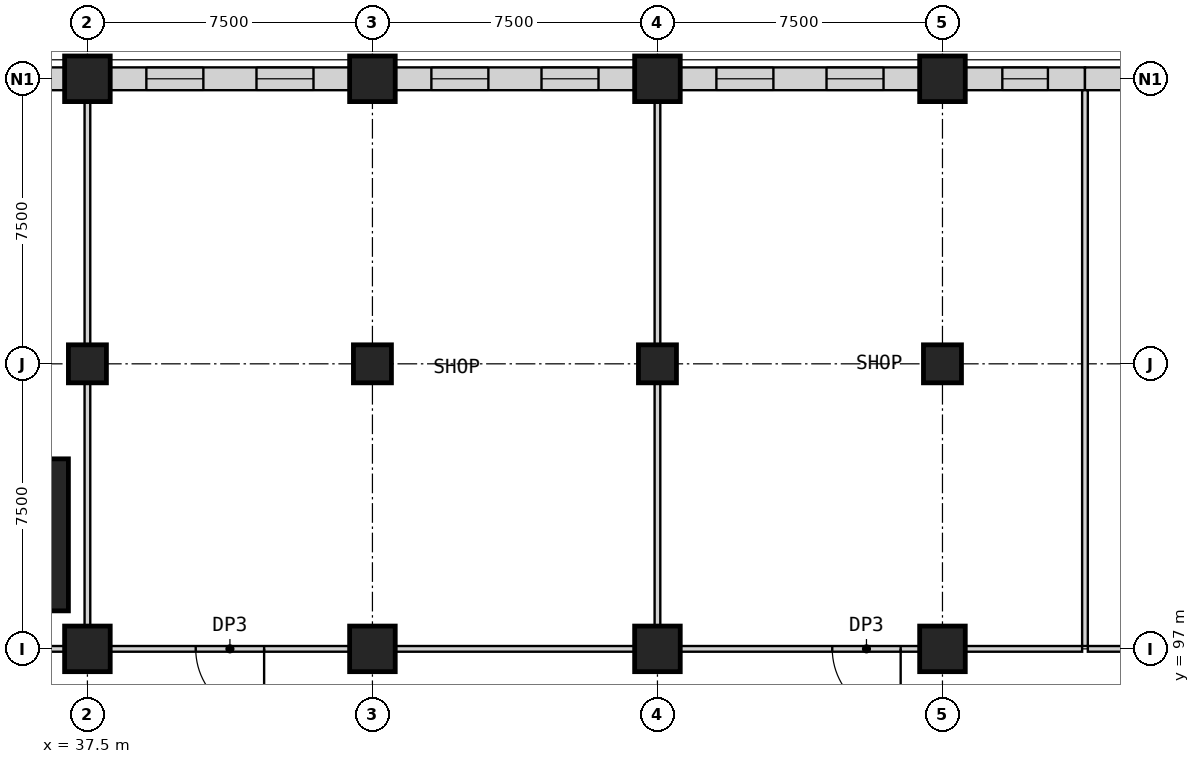
"""IFC4 building model, lengths in metres.
Left out: names, types, materials, properties, quantities, classifications, styles, units other than length and angle.
Written with IfcOpenShell. Run it as: python <this file> out.ifc"""

import sys

from ifc_helpers import new_model, si_unit, direction, frame, frame_2d, origin, origin_2d, place, context, subcontext, project, spatial, rectangle, extrude, element, fill, save


model = new_model("IFC4")
c1 = context("Model", 3, precision=1e-05, world=origin(), true_north=direction((0.0, 1.0)))
c2 = subcontext(c1, "Body", "Model", "MODEL_VIEW")
j1 = project(units=[si_unit("LENGTHUNIT", "METRE"), si_unit("PLANEANGLEUNIT", "RADIAN")], contexts=[c1])
p1 = place(None, origin())
s1 = spatial("IfcSite", under=j1, at=p1, CompositionType="ELEMENT")
p2 = place(p1, origin())
s2 = spatial("IfcBuilding", under=s1, at=p2, CompositionType="ELEMENT")
p3 = place(p2, frame((0.0, 0.0, 13.5)))
s3 = spatial("IfcBuildingStorey", under=s2, at=p3, CompositionType="ELEMENT", Elevation=13.5)
p4 = place(p3, frame((37.5, 97.0, 0.0), z_axis=(0.0, 0.0, 1.0), x_axis=(1.0, 0.0, 0.0)))
e1 = element("IfcColumn", 1, at=p4, inside=s3, PredefinedType="COLUMN", context=c2, shape_type="SweptSolid", body=[
    extrude(rectangle(XDim=1.2, YDim=1.2, at=origin_2d()), origin(), (0.0, 0.0, 1.0), 5.0),
])
p5 = place(p3, frame((37.5, 104.5, 0.0), z_axis=(0.0, 0.0, 1.0), x_axis=(1.0, 0.0, 0.0)))
e2 = element("IfcColumn", 2, at=p5, inside=s3, PredefinedType="COLUMN", context=c2, shape_type="SweptSolid", body=[
    extrude(rectangle(XDim=1.0, YDim=1.0, at=origin_2d()), origin(), (0.0, 0.0, 1.0), 5.0),
])
p6 = place(p3, frame((45.0, 97.0, 0.0), z_axis=(0.0, 0.0, 1.0), x_axis=(1.0, 0.0, 0.0)))
e3 = element("IfcColumn", 3, at=p6, inside=s3, PredefinedType="COLUMN", context=c2, shape_type="SweptSolid", body=[
    extrude(rectangle(XDim=1.2, YDim=1.2, at=origin_2d()), origin(), (0.0, 0.0, 1.0), 5.0),
])
p7 = place(p3, frame((45.0, 104.5, 0.0), z_axis=(0.0, 0.0, 1.0), x_axis=(1.0, 0.0, 0.0)))
e4 = element("IfcColumn", 4, at=p7, inside=s3, PredefinedType="COLUMN", context=c2, shape_type="SweptSolid", body=[
    extrude(rectangle(XDim=1.0, YDim=1.0, at=origin_2d()), origin(), (0.0, 0.0, 1.0), 5.0),
])
p8 = place(p3, frame((52.5, 97.0, 0.0), z_axis=(0.0, 0.0, 1.0), x_axis=(1.0, 0.0, 0.0)))
e5 = element("IfcColumn", 5, at=p8, inside=s3, PredefinedType="COLUMN", context=c2, shape_type="SweptSolid", body=[
    extrude(rectangle(XDim=1.2, YDim=1.2, at=origin_2d()), origin(), (0.0, 0.0, 1.0), 5.0),
])
p9 = place(p3, frame((52.5, 104.5, 0.0), z_axis=(0.0, 0.0, 1.0), x_axis=(1.0, 0.0, 0.0)))
e6 = element("IfcColumn", 6, at=p9, inside=s3, PredefinedType="COLUMN", context=c2, shape_type="SweptSolid", body=[
    extrude(rectangle(XDim=1.0, YDim=1.0, at=origin_2d()), origin(), (0.0, 0.0, 1.0), 5.0),
])
p10 = place(p3, frame((60.0, 97.0, 0.0), z_axis=(0.0, 0.0, 1.0), x_axis=(1.0, 0.0, 0.0)))
e7 = element("IfcColumn", 7, at=p10, inside=s3, PredefinedType="COLUMN", context=c2, shape_type="SweptSolid", body=[
    extrude(rectangle(XDim=1.2, YDim=1.2, at=origin_2d()), origin(), (0.0, 0.0, 1.0), 5.0),
])
p11 = place(p3, frame((60.0, 104.5, 0.0), z_axis=(0.0, 0.0, 1.0), x_axis=(1.0, 0.0, 0.0)))
e8 = element("IfcColumn", 8, at=p11, inside=s3, PredefinedType="COLUMN", context=c2, shape_type="SweptSolid", body=[
    extrude(rectangle(XDim=1.0, YDim=1.0, at=origin_2d()), origin(), (0.0, 0.0, 1.0), 5.0),
])
p12 = place(p3, frame((35.0, 100.0, 0.0), z_axis=(0.0, 0.0, 1.0), x_axis=(1.0, 0.0, 0.0)))
e9 = element("IfcColumn", 9, at=p12, inside=s3, PredefinedType="COLUMN", context=c2, shape_type="SweptSolid", body=[
    extrude(rectangle(XDim=4.0, YDim=4.0, at=origin_2d()), origin(), (0.0, 0.0, 1.0), 5.0),
])
for number, where, z_axis, x_axis in (
    (10, (37.5, 112.0, 0.0), (0.0, 0.0, 1.0), (1.0, 0.0, 0.0)),
    (11, (45.0, 112.0, 0.0), (0.0, 0.0, 1.0), (1.0, 0.0, 0.0)),
    (12, (52.5, 112.0, 0.0), (0.0, 0.0, 1.0), (1.0, 0.0, 0.0)),
    (13, (60.0, 112.0, 0.0), (0.0, 0.0, 1.0), (1.0, 0.0, 0.0)),
):
    element("IfcColumn", number, at=place(p3, frame(where, z_axis=z_axis, x_axis=x_axis)), inside=s3, PredefinedType="COLUMN", context=c2, shape_type="SweptSolid", body=[
        extrude(rectangle(XDim=1.2, YDim=1.2, at=origin_2d()), origin(), (0.0, 0.0, 1.0), 5.0),
    ])
p13 = place(p3, frame((31.0, 97.0, 0.0), z_axis=(0.0, 0.0, 1.0), x_axis=(1.0, 0.0, 0.0)))
e14 = element("IfcWall", 14, at=p13, inside=s3, PredefinedType="PARTITIONING", context=c2, shape_type="SweptSolid", body=[
    extrude(rectangle(XDim=5.9, YDim=0.15, at=frame_2d((2.95, 0.0))), origin(), (0.0, 0.0, 1.0), 4.7),
])
p14 = place(p3, frame((44.4, 97.0, 0.0), z_axis=(0.0, 0.0, 1.0), x_axis=(-1.0, 0.0, 0.0)))
e15 = element("IfcWall", 15, at=p14, inside=s3, PredefinedType="PARTITIONING", context=c2, shape_type="SweptSolid", body=[
    extrude(rectangle(XDim=6.3, YDim=0.15, at=frame_2d((3.15, 0.0))), origin(), (0.0, 0.0, 1.0), 4.7),
])
p15 = place(p14, frame((2.25, 0.0, 0.0)))
e16 = element("IfcOpeningElement", 16, at=p15, cuts=e15, PredefinedType="OPENING", context=c2, shape_type="SweptSolid", body=[
    extrude(rectangle(XDim=1.8, YDim=2.4, at=frame_2d((0.9, 1.2))), frame((0.0, 0.085, 0.0), z_axis=(0.0, -1.0, 0.0), x_axis=(1.0, 0.0, 0.0)), (0.0, 0.0, 1.0), 0.17),
])
p16 = place(p3, frame((45.6, 97.0, 0.0), z_axis=(0.0, 0.0, 1.0), x_axis=(1.0, 0.0, 0.0)))
e17 = element("IfcWall", 17, at=p16, inside=s3, PredefinedType="PARTITIONING", context=c2, shape_type="SweptSolid", body=[
    extrude(rectangle(XDim=6.3, YDim=0.15, at=frame_2d((3.15, 0.0))), origin(), (0.0, 0.0, 1.0), 4.7),
])
p17 = place(p3, frame((59.4, 97.0, 0.0), z_axis=(0.0, 0.0, 1.0), x_axis=(-1.0, 0.0, 0.0)))
e18 = element("IfcWall", 18, at=p17, inside=s3, PredefinedType="PARTITIONING", context=c2, shape_type="SweptSolid", body=[
    extrude(rectangle(XDim=6.3, YDim=0.15, at=frame_2d((3.15, 0.0))), origin(), (0.0, 0.0, 1.0), 4.7),
])
p18 = place(p17, frame((0.5, 0.0, 0.0)))
e19 = element("IfcOpeningElement", 19, at=p18, cuts=e18, PredefinedType="OPENING", context=c2, shape_type="SweptSolid", body=[
    extrude(rectangle(XDim=1.8, YDim=2.4, at=frame_2d((0.9, 1.2))), frame((0.0, 0.085, 0.0), z_axis=(0.0, -1.0, 0.0), x_axis=(1.0, 0.0, 0.0)), (0.0, 0.0, 1.0), 0.17),
])
for number, where, z_axis, x_axis in (
    (20, (60.6, 97.0, 0.0), (0.0, 0.0, 1.0), (1.0, 0.0, 0.0)),
    (21, (63.825, 97.0, 0.0), (0.0, 0.0, 1.0), (1.0, 0.0, 0.0)),
):
    element("IfcWall", number, at=place(p3, frame(where, z_axis=z_axis, x_axis=x_axis)), inside=s3, PredefinedType="PARTITIONING", context=c2, shape_type="SweptSolid", body=[
        extrude(rectangle(XDim=3.075, YDim=0.15, at=frame_2d((1.538, 0.0))), origin(), (0.0, 0.0, 1.0), 4.7),
    ])
p19 = place(p3, frame((31.1, 112.0, 0.0), z_axis=(0.0, 0.0, 1.0), x_axis=(1.0, 0.0, 0.0)))
e22 = element("IfcWall", 22, at=p19, inside=s3, PredefinedType="PARTITIONING", context=c2, shape_type="SweptSolid", body=[
    extrude(rectangle(XDim=5.8, YDim=0.6, at=frame_2d((2.9, 0.0))), origin(), (0.0, 0.0, 1.0), 4.1),
])
p20 = place(p19, frame((0.816, 0.0, 0.9)))
e23 = element("IfcOpeningElement", 23, at=p20, cuts=e22, PredefinedType="OPENING", context=c2, shape_type="SweptSolid", body=[
    extrude(rectangle(XDim=1.5, YDim=2.8, at=frame_2d((0.75, 1.4))), frame((0.0, 0.31, 0.0), z_axis=(0.0, -1.0, 0.0), x_axis=(1.0, 0.0, 0.0)), (0.0, 0.0, 1.0), 0.62),
])
p21 = place(p19, frame((3.484, 0.0, 0.9)))
e24 = element("IfcOpeningElement", 24, at=p21, cuts=e22, PredefinedType="OPENING", context=c2, shape_type="SweptSolid", body=[
    extrude(rectangle(XDim=1.5, YDim=2.8, at=frame_2d((0.75, 1.4))), frame((0.0, 0.31, 0.0), z_axis=(0.0, -1.0, 0.0), x_axis=(1.0, 0.0, 0.0)), (0.0, 0.0, 1.0), 0.62),
])
p22 = place(p3, frame((38.1, 112.0, 0.0), z_axis=(0.0, 0.0, 1.0), x_axis=(1.0, 0.0, 0.0)))
e25 = element("IfcWall", 25, at=p22, inside=s3, PredefinedType="PARTITIONING", context=c2, shape_type="SweptSolid", body=[
    extrude(rectangle(XDim=6.3, YDim=0.6, at=frame_2d((3.15, 0.0))), origin(), (0.0, 0.0, 1.0), 4.1),
])
p23 = place(p22, frame((0.951, 0.0, 0.9)))
e26 = element("IfcOpeningElement", 26, at=p23, cuts=e25, PredefinedType="OPENING", context=c2, shape_type="SweptSolid", body=[
    extrude(rectangle(XDim=1.5, YDim=2.8, at=frame_2d((0.75, 1.4))), frame((0.0, 0.31, 0.0), z_axis=(0.0, -1.0, 0.0), x_axis=(1.0, 0.0, 0.0)), (0.0, 0.0, 1.0), 0.62),
])
p24 = place(p22, frame((3.849, 0.0, 0.9)))
e27 = element("IfcOpeningElement", 27, at=p24, cuts=e25, PredefinedType="OPENING", context=c2, shape_type="SweptSolid", body=[
    extrude(rectangle(XDim=1.5, YDim=2.8, at=frame_2d((0.75, 1.4))), frame((0.0, 0.31, 0.0), z_axis=(0.0, -1.0, 0.0), x_axis=(1.0, 0.0, 0.0)), (0.0, 0.0, 1.0), 0.62),
])
p25 = place(p3, frame((45.6, 112.0, 0.0), z_axis=(0.0, 0.0, 1.0), x_axis=(1.0, 0.0, 0.0)))
e28 = element("IfcWall", 28, at=p25, inside=s3, PredefinedType="PARTITIONING", context=c2, shape_type="SweptSolid", body=[
    extrude(rectangle(XDim=6.3, YDim=0.6, at=frame_2d((3.15, 0.0))), origin(), (0.0, 0.0, 1.0), 4.1),
])
p26 = place(p25, frame((0.951, 0.0, 0.9)))
e29 = element("IfcOpeningElement", 29, at=p26, cuts=e28, PredefinedType="OPENING", context=c2, shape_type="SweptSolid", body=[
    extrude(rectangle(XDim=1.5, YDim=2.8, at=frame_2d((0.75, 1.4))), frame((0.0, 0.31, 0.0), z_axis=(0.0, -1.0, 0.0), x_axis=(1.0, 0.0, 0.0)), (0.0, 0.0, 1.0), 0.62),
])
p27 = place(p25, frame((3.849, 0.0, 0.9)))
e30 = element("IfcOpeningElement", 30, at=p27, cuts=e28, PredefinedType="OPENING", context=c2, shape_type="SweptSolid", body=[
    extrude(rectangle(XDim=1.5, YDim=2.8, at=frame_2d((0.75, 1.4))), frame((0.0, 0.31, 0.0), z_axis=(0.0, -1.0, 0.0), x_axis=(1.0, 0.0, 0.0)), (0.0, 0.0, 1.0), 0.62),
])
p28 = place(p3, frame((53.1, 112.0, 0.0), z_axis=(0.0, 0.0, 1.0), x_axis=(1.0, 0.0, 0.0)))
e31 = element("IfcWall", 31, at=p28, inside=s3, PredefinedType="PARTITIONING", context=c2, shape_type="SweptSolid", body=[
    extrude(rectangle(XDim=6.3, YDim=0.6, at=frame_2d((3.15, 0.0))), origin(), (0.0, 0.0, 1.0), 4.1),
])
p29 = place(p28, frame((0.951, 0.0, 0.9)))
e32 = element("IfcOpeningElement", 32, at=p29, cuts=e31, PredefinedType="OPENING", context=c2, shape_type="SweptSolid", body=[
    extrude(rectangle(XDim=1.5, YDim=2.8, at=frame_2d((0.75, 1.4))), frame((0.0, 0.31, 0.0), z_axis=(0.0, -1.0, 0.0), x_axis=(1.0, 0.0, 0.0)), (0.0, 0.0, 1.0), 0.62),
])
p30 = place(p28, frame((3.849, 0.0, 0.9)))
e33 = element("IfcOpeningElement", 33, at=p30, cuts=e31, PredefinedType="OPENING", context=c2, shape_type="SweptSolid", body=[
    extrude(rectangle(XDim=1.5, YDim=2.8, at=frame_2d((0.75, 1.4))), frame((0.0, 0.31, 0.0), z_axis=(0.0, -1.0, 0.0), x_axis=(1.0, 0.0, 0.0)), (0.0, 0.0, 1.0), 0.62),
])
p31 = place(p3, frame((60.6, 112.0, 0.0), z_axis=(0.0, 0.0, 1.0), x_axis=(1.0, 0.0, 0.0)))
e34 = element("IfcWall", 34, at=p31, inside=s3, PredefinedType="PARTITIONING", context=c2, shape_type="SweptSolid", body=[
    extrude(rectangle(XDim=3.15, YDim=0.6, at=frame_2d((1.575, 0.0))), origin(), (0.0, 0.0, 1.0), 4.1),
])
p32 = place(p31, frame((0.975, 0.0, 0.9)))
e35 = element("IfcOpeningElement", 35, at=p32, cuts=e34, PredefinedType="OPENING", context=c2, shape_type="SweptSolid", body=[
    extrude(rectangle(XDim=1.2, YDim=2.8, at=frame_2d((0.6, 1.4))), frame((0.0, 0.31, 0.0), z_axis=(0.0, -1.0, 0.0), x_axis=(1.0, 0.0, 0.0)), (0.0, 0.0, 1.0), 0.62),
])
p33 = place(p3, frame((63.75, 112.0, 0.0), z_axis=(0.0, 0.0, 1.0), x_axis=(1.0, 0.0, 0.0)))
e36 = element("IfcWall", 36, at=p33, inside=s3, PredefinedType="PARTITIONING", context=c2, shape_type="SweptSolid", body=[
    extrude(rectangle(XDim=3.15, YDim=0.6, at=frame_2d((1.575, 0.0))), origin(), (0.0, 0.0, 1.0), 4.1),
])
p34 = place(p33, frame((0.975, 0.0, 0.9)))
e37 = element("IfcOpeningElement", 37, at=p34, cuts=e36, PredefinedType="OPENING", context=c2, shape_type="SweptSolid", body=[
    extrude(rectangle(XDim=1.2, YDim=2.8, at=frame_2d((0.6, 1.4))), frame((0.0, 0.31, 0.0), z_axis=(0.0, -1.0, 0.0), x_axis=(1.0, 0.0, 0.0)), (0.0, 0.0, 1.0), 0.62),
])
p35 = place(p3, frame((63.75, 97.075, 0.0), z_axis=(0.0, 0.0, 1.0), x_axis=(0.0, 1.0, 0.0)))
e38 = element("IfcWall", 38, at=p35, inside=s3, PredefinedType="PARTITIONING", context=c2, shape_type="SweptSolid", body=[
    extrude(rectangle(XDim=14.625, YDim=0.15, at=frame_2d((7.312, 0.0))), origin(), (0.0, 0.0, 1.0), 4.7),
])
for number, where, z_axis, x_axis in (
    (39, (37.5, 97.6, 0.0), (0.0, 0.0, 1.0), (0.0, 1.0, 0.0)),
    (40, (37.5, 105.0, 0.0), (0.0, 0.0, 1.0), (0.0, 1.0, 0.0)),
    (41, (52.5, 97.6, 0.0), (0.0, 0.0, 1.0), (0.0, 1.0, 0.0)),
    (42, (52.5, 105.0, 0.0), (0.0, 0.0, 1.0), (0.0, 1.0, 0.0)),
):
    element("IfcWall", number, at=place(p3, frame(where, z_axis=z_axis, x_axis=x_axis)), inside=s3, PredefinedType="PARTITIONING", context=c2, shape_type="SweptSolid", body=[
        extrude(rectangle(XDim=6.4, YDim=0.15, at=frame_2d((3.2, 0.0))), origin(), (0.0, 0.0, 1.0), 4.7),
    ])
p36 = place(p15, origin())
e43 = element("IfcDoor", 43, at=p36, inside=s3, OperationType="SINGLE_SWING_LEFT", PredefinedType="DOOR", context=c2, shape_type="SweptSolid", body=[
    extrude(rectangle(XDim=1.8, YDim=2.4, at=frame_2d((0.9, 1.2))), frame((0.0, 0.025, 0.0), z_axis=(0.0, -1.0, 0.0), x_axis=(1.0, 0.0, 0.0)), (0.0, 0.0, 1.0), 0.05),
])
fill(e16, e43)
p37 = place(p18, origin())
e44 = element("IfcDoor", 44, at=p37, inside=s3, OperationType="SINGLE_SWING_LEFT", PredefinedType="DOOR", context=c2, shape_type="SweptSolid", body=[
    extrude(rectangle(XDim=1.8, YDim=2.4, at=frame_2d((0.9, 1.2))), frame((0.0, 0.025, 0.0), z_axis=(0.0, -1.0, 0.0), x_axis=(1.0, 0.0, 0.0)), (0.0, 0.0, 1.0), 0.05),
])
fill(e19, e44)
p38 = place(p23, origin())
e45 = element("IfcWindow", 45, at=p38, inside=s3, PartitioningType="SINGLE_PANEL", PredefinedType="WINDOW", context=c2, shape_type="SweptSolid", body=[
    extrude(rectangle(XDim=1.5, YDim=2.8, at=frame_2d((0.75, 1.4))), frame((0.0, 0.03, 0.0), z_axis=(0.0, -1.0, 0.0), x_axis=(1.0, 0.0, 0.0)), (0.0, 0.0, 1.0), 0.06),
])
fill(e26, e45)
p39 = place(p24, origin())
e46 = element("IfcWindow", 46, at=p39, inside=s3, PartitioningType="SINGLE_PANEL", PredefinedType="WINDOW", context=c2, shape_type="SweptSolid", body=[
    extrude(rectangle(XDim=1.5, YDim=2.8, at=frame_2d((0.75, 1.4))), frame((0.0, 0.03, 0.0), z_axis=(0.0, -1.0, 0.0), x_axis=(1.0, 0.0, 0.0)), (0.0, 0.0, 1.0), 0.06),
])
fill(e27, e46)
p40 = place(p26, origin())
e47 = element("IfcWindow", 47, at=p40, inside=s3, PartitioningType="SINGLE_PANEL", PredefinedType="WINDOW", context=c2, shape_type="SweptSolid", body=[
    extrude(rectangle(XDim=1.5, YDim=2.8, at=frame_2d((0.75, 1.4))), frame((0.0, 0.03, 0.0), z_axis=(0.0, -1.0, 0.0), x_axis=(1.0, 0.0, 0.0)), (0.0, 0.0, 1.0), 0.06),
])
fill(e29, e47)
p41 = place(p27, origin())
e48 = element("IfcWindow", 48, at=p41, inside=s3, PartitioningType="SINGLE_PANEL", PredefinedType="WINDOW", context=c2, shape_type="SweptSolid", body=[
    extrude(rectangle(XDim=1.5, YDim=2.8, at=frame_2d((0.75, 1.4))), frame((0.0, 0.03, 0.0), z_axis=(0.0, -1.0, 0.0), x_axis=(1.0, 0.0, 0.0)), (0.0, 0.0, 1.0), 0.06),
])
fill(e30, e48)
p42 = place(p29, origin())
e49 = element("IfcWindow", 49, at=p42, inside=s3, PartitioningType="SINGLE_PANEL", PredefinedType="WINDOW", context=c2, shape_type="SweptSolid", body=[
    extrude(rectangle(XDim=1.5, YDim=2.8, at=frame_2d((0.75, 1.4))), frame((0.0, 0.03, 0.0), z_axis=(0.0, -1.0, 0.0), x_axis=(1.0, 0.0, 0.0)), (0.0, 0.0, 1.0), 0.06),
])
fill(e32, e49)
p43 = place(p30, origin())
e50 = element("IfcWindow", 50, at=p43, inside=s3, PartitioningType="SINGLE_PANEL", PredefinedType="WINDOW", context=c2, shape_type="SweptSolid", body=[
    extrude(rectangle(XDim=1.5, YDim=2.8, at=frame_2d((0.75, 1.4))), frame((0.0, 0.03, 0.0), z_axis=(0.0, -1.0, 0.0), x_axis=(1.0, 0.0, 0.0)), (0.0, 0.0, 1.0), 0.06),
])
fill(e33, e50)
p44 = place(p32, origin())
e51 = element("IfcWindow", 51, at=p44, inside=s3, PartitioningType="SINGLE_PANEL", PredefinedType="WINDOW", context=c2, shape_type="SweptSolid", body=[
    extrude(rectangle(XDim=1.2, YDim=2.8, at=frame_2d((0.6, 1.4))), frame((0.0, 0.03, 0.0), z_axis=(0.0, -1.0, 0.0), x_axis=(1.0, 0.0, 0.0)), (0.0, 0.0, 1.0), 0.06),
])
fill(e35, e51)
save(model, sys.argv[1])
